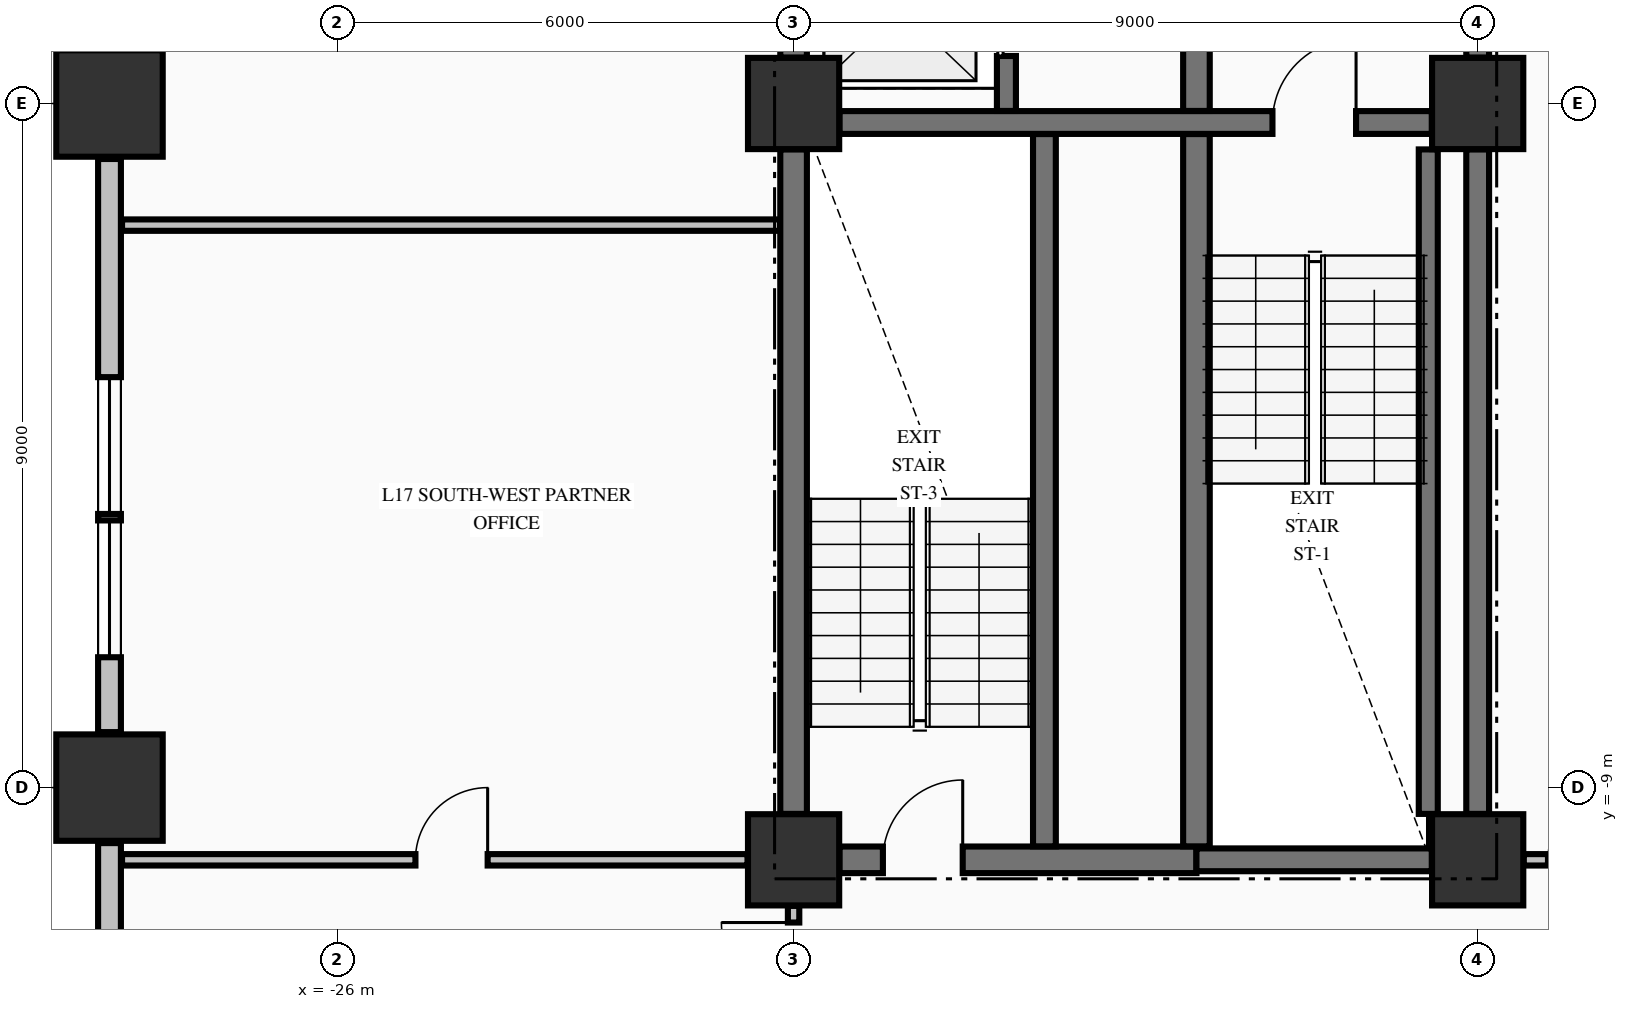
"""IFC4 building model, lengths in metres.
Left out: names, types, materials, properties, quantities, classifications, styles, units other than length and angle.
Written with IfcOpenShell. Run it as: python <this file> out.ifc"""

import sys

from ifc_helpers import new_model, si_unit, direction, frame, frame_2d, origin, origin_2d, place, context, subcontext, project, spatial, rectangle, extrude, element, fill, save


model = new_model("IFC4")
c1 = context("Model", 3, precision=1e-05, world=origin(), true_north=direction((0.0, 1.0)))
c2 = subcontext(c1, "Body", "Model", "MODEL_VIEW")
j1 = project(units=[si_unit("LENGTHUNIT", "METRE"), si_unit("PLANEANGLEUNIT", "RADIAN")], contexts=[c1])
p1 = place(None, origin())
s1 = spatial("IfcSite", under=j1, at=p1, CompositionType="ELEMENT")
p2 = place(p1, origin())
s2 = spatial("IfcBuilding", under=s1, at=p2, CompositionType="ELEMENT")
p3 = place(p2, frame((0.0, 0.0, 71.47)))
s3 = spatial("IfcBuildingStorey", under=s2, at=p3, CompositionType="ELEMENT", Elevation=71.47)
for number, where, z_axis, x_axis in (
    (1, (-29.0, -9.0, -0.325), (0.0, 0.0, 1.0), (1.0, 0.0, 0.0)),
    (2, (-29.0, 0.0, -0.325), (0.0, 0.0, 1.0), (1.0, 0.0, 0.0)),
):
    element("IfcColumn", number, at=place(p3, frame(where, z_axis=z_axis, x_axis=x_axis)), inside=s3, PredefinedType="COLUMN", context=c2, shape_type="SweptSolid", body=[
        extrude(rectangle(XDim=1.4, YDim=1.4, at=origin_2d()), origin(), (0.0, 0.0, 1.0), 3.645),
    ])
for number, where, z_axis, x_axis in (
    (3, (-20.0, -9.95, -0.325), (0.0, 0.0, 1.0), (1.0, 0.0, 0.0)),
    (4, (-11.0, -9.95, -0.325), (0.0, 0.0, 1.0), (1.0, 0.0, 0.0)),
    (5, (-11.0, 0.0, -0.325), (0.0, 0.0, 1.0), (1.0, 0.0, 0.0)),
    (6, (-20.0, 0.0, -0.325), (0.0, 0.0, 1.0), (1.0, 0.0, 0.0)),
):
    element("IfcColumn", number, at=place(p3, frame(where, z_axis=z_axis, x_axis=x_axis)), inside=s3, PredefinedType="COLUMN", context=c2, shape_type="SweptSolid", body=[
        extrude(rectangle(XDim=1.2, YDim=1.2, at=origin_2d()), origin(), (0.0, 0.0, 1.0), 3.645),
    ])
p4 = place(p3, frame((-29.0, -9.73, 0.0), z_axis=(0.0, 0.0, 1.0), x_axis=(0.0, -1.0, 0.0)))
e7 = element("IfcWall", 7, at=p4, inside=s3, PredefinedType="STANDARD", context=c2, shape_type="SweptSolid", body=[
    extrude(rectangle(XDim=12.54, YDim=0.3, at=frame_2d((6.27, 0.0))), origin(), (0.0, 0.0, 1.0), 2.712),
])
p5 = place(p3, frame((-29.0, -0.73, 0.0), z_axis=(0.0, 0.0, 1.0), x_axis=(0.0, -1.0, 0.0)))
e8 = element("IfcWall", 8, at=p5, inside=s3, PredefinedType="STANDARD", context=c2, shape_type="SweptSolid", body=[
    extrude(rectangle(XDim=7.54, YDim=0.3, at=frame_2d((3.77, 0.0))), origin(), (0.0, 0.0, 1.0), 2.712),
])
p6 = place(p5, frame((2.87, 0.0, 0.78)))
e9 = element("IfcOpeningElement", 9, at=p6, cuts=e8, PredefinedType="OPENING", context=c2, shape_type="SweptSolid", body=[
    extrude(rectangle(XDim=1.8, YDim=1.72, at=frame_2d((0.9, 0.86))), frame((0.0, 0.16, 0.0), z_axis=(0.0, -1.0, 0.0), x_axis=(1.0, 0.0, 0.0)), (0.0, 0.0, 1.0), 0.32),
])
p7 = place(p5, frame((4.755, 0.0, 0.78)))
e10 = element("IfcOpeningElement", 10, at=p7, cuts=e8, PredefinedType="OPENING", context=c2, shape_type="SweptSolid", body=[
    extrude(rectangle(XDim=1.8, YDim=1.72, at=frame_2d((0.9, 0.86))), frame((0.0, 0.16, 0.0), z_axis=(0.0, -1.0, 0.0), x_axis=(1.0, 0.0, 0.0)), (0.0, 0.0, 1.0), 0.32),
])
p8 = place(p3, frame((-19.396, -9.95, 0.0), z_axis=(0.0, 0.0, 1.0), x_axis=(1.0, 0.0, 0.0)))
e11 = element("IfcWall", 11, at=p8, inside=s3, PredefinedType="SHEAR", context=c2, shape_type="SweptSolid", body=[
    extrude(rectangle(XDim=4.696, YDim=0.35, at=frame_2d((2.348, 0.0))), origin(), (0.0, 0.0, 1.0), 3.32),
])
p9 = place(p8, frame((0.571, 0.0, 0.0)))
e12 = element("IfcOpeningElement", 12, at=p9, cuts=e11, PredefinedType="OPENING", context=c2, shape_type="SweptSolid", body=[
    extrude(rectangle(XDim=1.05, YDim=2.15, at=frame_2d((0.525, 1.075))), frame((0.0, 0.185, 0.0), z_axis=(0.0, -1.0, 0.0), x_axis=(1.0, 0.0, 0.0)), (0.0, 0.0, 1.0), 0.37),
])
p10 = place(p3, frame((-14.7, -9.95, 0.0), z_axis=(0.0, 0.0, 1.0), x_axis=(1.0, 0.0, 0.0)))
e13 = element("IfcWall", 13, at=p10, inside=s3, PredefinedType="SHEAR", context=c2, shape_type="SweptSolid", body=[
    extrude(rectangle(XDim=3.096, YDim=0.3, at=frame_2d((1.548, 0.0))), origin(), (0.0, 0.0, 1.0), 3.32),
])
p11 = place(p3, frame((-19.396, -0.25, 0.0), z_axis=(0.0, 0.0, 1.0), x_axis=(1.0, 0.0, 0.0)))
e14 = element("IfcWall", 14, at=p11, inside=s3, PredefinedType="SHEAR", context=c2, shape_type="SweptSolid", body=[
    extrude(rectangle(XDim=7.792, YDim=0.3, at=frame_2d((3.896, 0.0))), origin(), (0.0, 0.0, 1.0), 3.32),
])
p12 = place(p11, frame((5.696, 0.0, 0.0)))
e15 = element("IfcOpeningElement", 15, at=p12, cuts=e14, PredefinedType="OPENING", context=c2, shape_type="SweptSolid", body=[
    extrude(rectangle(XDim=1.1, YDim=2.15, at=frame_2d((0.55, 1.075))), frame((0.0, 0.16, 0.0), z_axis=(0.0, -1.0, 0.0), x_axis=(1.0, 0.0, 0.0)), (0.0, 0.0, 1.0), 0.32),
])
p13 = place(p3, frame((-28.835, -9.95, 0.0), z_axis=(0.0, 0.0, 1.0), x_axis=(1.0, 0.0, 0.0)))
e16 = element("IfcWall", 16, at=p13, inside=s3, PredefinedType="PARTITIONING", context=c2, shape_type="SweptSolid", body=[
    extrude(rectangle(XDim=8.229, YDim=0.15, at=frame_2d((4.115, 0.0))), origin(), (0.0, 0.0, 1.0), 3.32),
])
p14 = place(p13, frame((3.86, 0.0, 0.0)))
e17 = element("IfcOpeningElement", 17, at=p14, cuts=e16, PredefinedType="OPENING", context=c2, shape_type="SweptSolid", body=[
    extrude(rectangle(XDim=0.95, YDim=2.15, at=frame_2d((0.475, 1.075))), frame((0.0, 0.085, 0.0), z_axis=(0.0, -1.0, 0.0), x_axis=(1.0, 0.0, 0.0)), (0.0, 0.0, 1.0), 0.17),
])
p15 = place(p3, frame((-10.394, -9.95, 0.0), z_axis=(0.0, 0.0, 1.0), x_axis=(1.0, 0.0, 0.0)))
e18 = element("IfcWall", 18, at=p15, inside=s3, PredefinedType="PARTITIONING", context=c2, shape_type="SweptSolid", body=[
    extrude(rectangle(XDim=20.788, YDim=0.15, at=frame_2d((10.394, 0.0))), origin(), (0.0, 0.0, 1.0), 3.32),
])
p16 = place(p15, frame((0.319, 0.0, 0.0)))
e19 = element("IfcOpeningElement", 19, at=p16, cuts=e18, PredefinedType="OPENING", context=c2, shape_type="SweptSolid", body=[
    extrude(rectangle(XDim=1.05, YDim=2.15, at=frame_2d((0.525, 1.075))), frame((0.0, 0.085, 0.0), z_axis=(0.0, -1.0, 0.0), x_axis=(1.0, 0.0, 0.0)), (0.0, 0.0, 1.0), 0.17),
])
p17 = place(p15, frame((19.419, 0.0, 0.0)))
e20 = element("IfcOpeningElement", 20, at=p17, cuts=e18, PredefinedType="OPENING", context=c2, shape_type="SweptSolid", body=[
    extrude(rectangle(XDim=1.05, YDim=2.15, at=frame_2d((0.525, 1.075))), frame((0.0, 0.085, 0.0), z_axis=(0.0, -1.0, 0.0), x_axis=(1.0, 0.0, 0.0)), (0.0, 0.0, 1.0), 0.17),
])
p18 = place(p15, frame((11.569, 0.0, 0.0)))
e21 = element("IfcOpeningElement", 21, at=p18, cuts=e18, PredefinedType="OPENING", context=c2, shape_type="SweptSolid", body=[
    extrude(rectangle(XDim=0.95, YDim=2.15, at=frame_2d((0.475, 1.075))), frame((0.0, 0.085, 0.0), z_axis=(0.0, -1.0, 0.0), x_axis=(1.0, 0.0, 0.0)), (0.0, 0.0, 1.0), 0.17),
])
p19 = place(p3, frame((-28.835, -1.6, 0.0), z_axis=(0.0, 0.0, 1.0), x_axis=(1.0, 0.0, 0.0)))
e22 = element("IfcWall", 22, at=p19, inside=s3, PredefinedType="PARTITIONING", context=c2, shape_type="SweptSolid", body=[
    extrude(rectangle(XDim=8.657, YDim=0.15, at=frame_2d((4.329, 0.0))), origin(), (0.0, 0.0, 1.0), 3.32),
])
p20 = place(p3, frame((-20.0, -9.346, 0.0), z_axis=(0.0, 0.0, 1.0), x_axis=(0.0, 1.0, 0.0)))
e23 = element("IfcWall", 23, at=p20, inside=s3, PredefinedType="SHEAR", context=c2, shape_type="SweptSolid", body=[
    extrude(rectangle(XDim=8.742, YDim=0.35, at=frame_2d((4.371, 0.0))), origin(), (0.0, 0.0, 1.0), 3.32),
])
p21 = place(p3, frame((-20.0, 0.604, 0.0), z_axis=(0.0, 0.0, 1.0), x_axis=(0.0, 1.0, 0.0)))
e24 = element("IfcWall", 24, at=p21, inside=s3, PredefinedType="SHEAR", context=c2, shape_type="SweptSolid", body=[
    extrude(rectangle(XDim=1.869, YDim=0.35, at=frame_2d((0.935, 0.0))), origin(), (0.0, 0.0, 1.0), 3.32),
])
p22 = place(p3, frame((-17.2, -0.098, 0.0), z_axis=(0.0, 0.0, 1.0), x_axis=(0.0, 1.0, 0.0)))
e25 = element("IfcWall", 25, at=p22, inside=s3, PredefinedType="SOLIDWALL", context=c2, shape_type="SweptSolid", body=[
    extrude(rectangle(XDim=2.571, YDim=0.25, at=frame_2d((1.285, 0.0))), origin(), (0.0, 0.0, 1.0), 3.32),
])
p23 = place(p22, frame((0.723, 0.0, 0.0)))
e26 = element("IfcOpeningElement", 26, at=p23, cuts=e25, PredefinedType="OPENING", context=c2, shape_type="SweptSolid", body=[
    extrude(rectangle(XDim=1.1, YDim=2.2, at=frame_2d((0.55, 1.1))), frame((0.0, 0.135, 0.0), z_axis=(0.0, -1.0, 0.0), x_axis=(1.0, 0.0, 0.0)), (0.0, 0.0, 1.0), 0.27),
])
p24 = place(p3, frame((-16.7, -9.773, 0.0), z_axis=(0.0, 0.0, 1.0), x_axis=(0.0, 1.0, 0.0)))
e27 = element("IfcWall", 27, at=p24, inside=s3, PredefinedType="SHEAR", context=c2, shape_type="SweptSolid", body=[
    extrude(rectangle(XDim=9.371, YDim=0.3, at=frame_2d((4.686, 0.0))), origin(), (0.0, 0.0, 1.0), 3.32),
])
p25 = place(p3, frame((-14.7, -9.773, 0.0), z_axis=(0.0, 0.0, 1.0), x_axis=(0.0, 1.0, 0.0)))
e28 = element("IfcWall", 28, at=p25, inside=s3, PredefinedType="SHEAR", context=c2, shape_type="SweptSolid", body=[
    extrude(rectangle(XDim=9.371, YDim=0.35, at=frame_2d((4.686, 0.0))), origin(), (0.0, 0.0, 1.0), 3.32),
])
p26 = place(p3, frame((-14.7, -0.098, 0.0), z_axis=(0.0, 0.0, 1.0), x_axis=(0.0, 1.0, 0.0)))
e29 = element("IfcWall", 29, at=p26, inside=s3, PredefinedType="SHEAR", context=c2, shape_type="SweptSolid", body=[
    extrude(rectangle(XDim=2.846, YDim=0.35, at=frame_2d((1.423, 0.0))), origin(), (0.0, 0.0, 1.0), 3.32),
])
p27 = place(p3, frame((-11.65, -9.346, 0.0), z_axis=(0.0, 0.0, 1.0), x_axis=(0.0, 1.0, 0.0)))
e30 = element("IfcWall", 30, at=p27, inside=s3, PredefinedType="SOLIDWALL", context=c2, shape_type="SweptSolid", body=[
    extrude(rectangle(XDim=8.742, YDim=0.25, at=frame_2d((4.371, 0.0))), origin(), (0.0, 0.0, 1.0), 3.32),
])
p28 = place(p3, frame((-11.0, -9.346, 0.0), z_axis=(0.0, 0.0, 1.0), x_axis=(0.0, 1.0, 0.0)))
e31 = element("IfcWall", 31, at=p28, inside=s3, PredefinedType="SHEAR", context=c2, shape_type="SweptSolid", body=[
    extrude(rectangle(XDim=8.742, YDim=0.3, at=frame_2d((4.371, 0.0))), origin(), (0.0, 0.0, 1.0), 3.32),
])
p29 = place(p3, frame((-11.0, 0.604, 0.0), z_axis=(0.0, 0.0, 1.0), x_axis=(0.0, 1.0, 0.0)))
e32 = element("IfcWall", 32, at=p29, inside=s3, PredefinedType="SHEAR", context=c2, shape_type="SweptSolid", body=[
    extrude(rectangle(XDim=2.144, YDim=0.3, at=frame_2d((1.072, 0.0))), origin(), (0.0, 0.0, 1.0), 3.32),
])
p30 = place(p29, frame((0.496, 0.0, 0.0)))
e33 = element("IfcOpeningElement", 33, at=p30, cuts=e32, PredefinedType="OPENING", context=c2, shape_type="SweptSolid", body=[
    extrude(rectangle(XDim=1.1, YDim=2.15, at=frame_2d((0.55, 1.075))), frame((0.0, 0.16, 0.0), z_axis=(0.0, -1.0, 0.0), x_axis=(1.0, 0.0, 0.0)), (0.0, 0.0, 1.0), 0.32),
])
p31 = place(p3, frame((-20.0, -12.472, 0.0), z_axis=(0.0, 0.0, 1.0), x_axis=(0.0, 1.0, 0.0)))
e34 = element("IfcWall", 34, at=p31, inside=s3, PredefinedType="PARTITIONING", context=c2, shape_type="SweptSolid", body=[
    extrude(rectangle(XDim=1.916, YDim=0.15, at=frame_2d((0.958, 0.0))), origin(), (0.0, 0.0, 1.0), 2.66),
])
p32 = place(p31, frame((0.747, 0.0, 0.0)))
e35 = element("IfcOpeningElement", 35, at=p32, cuts=e34, PredefinedType="OPENING", context=c2, shape_type="SweptSolid", body=[
    extrude(rectangle(XDim=0.95, YDim=2.15, at=frame_2d((0.475, 1.075))), frame((0.0, 0.085, 0.0), z_axis=(0.0, -1.0, 0.0), x_axis=(1.0, 0.0, 0.0)), (0.0, 0.0, 1.0), 0.17),
])
p33 = place(p6, origin())
e36 = element("IfcWindow", 36, at=p33, inside=s3, PartitioningType="SINGLE_PANEL", PredefinedType="WINDOW", context=c2, shape_type="SweptSolid", body=[
    extrude(rectangle(XDim=1.8, YDim=1.72, at=frame_2d((0.9, 0.86))), frame((0.0, 0.03, 0.0), z_axis=(0.0, -1.0, 0.0), x_axis=(1.0, 0.0, 0.0)), (0.0, 0.0, 1.0), 0.06),
])
fill(e9, e36)
p34 = place(p7, origin())
e37 = element("IfcWindow", 37, at=p34, inside=s3, PartitioningType="SINGLE_PANEL", PredefinedType="WINDOW", context=c2, shape_type="SweptSolid", body=[
    extrude(rectangle(XDim=1.8, YDim=1.72, at=frame_2d((0.9, 0.86))), frame((0.0, 0.03, 0.0), z_axis=(0.0, -1.0, 0.0), x_axis=(1.0, 0.0, 0.0)), (0.0, 0.0, 1.0), 0.06),
])
fill(e10, e37)
p35 = place(p12, origin())
e38 = element("IfcDoor", 38, at=p35, inside=s3, OperationType="SINGLE_SWING_RIGHT", PredefinedType="DOOR", context=c2, shape_type="SweptSolid", body=[
    extrude(rectangle(XDim=1.1, YDim=2.15, at=frame_2d((0.55, 1.075))), frame((0.0, 0.025, 0.0), z_axis=(0.0, -1.0, 0.0), x_axis=(1.0, 0.0, 0.0)), (0.0, 0.0, 1.0), 0.05),
])
fill(e15, e38)
p36 = place(p9, origin())
e39 = element("IfcDoor", 39, at=p36, inside=s3, OperationType="SINGLE_SWING_RIGHT", PredefinedType="DOOR", context=c2, shape_type="SweptSolid", body=[
    extrude(rectangle(XDim=1.05, YDim=2.15, at=frame_2d((0.525, 1.075))), frame((0.0, 0.025, 0.0), z_axis=(0.0, -1.0, 0.0), x_axis=(1.0, 0.0, 0.0)), (0.0, 0.0, 1.0), 0.05),
])
fill(e12, e39)
p37 = place(p23, origin())
e40 = element("IfcDoor", 40, at=p37, inside=s3, OperationType="SLIDING_TO_LEFT", PredefinedType="DOOR", context=c2, shape_type="SweptSolid", body=[
    extrude(rectangle(XDim=1.1, YDim=2.2, at=frame_2d((0.55, 1.1))), frame((0.0, 0.025, 0.0), z_axis=(0.0, -1.0, 0.0), x_axis=(1.0, 0.0, 0.0)), (0.0, 0.0, 1.0), 0.05),
])
fill(e26, e40)
p38 = place(p32, origin())
e41 = element("IfcDoor", 41, at=p38, inside=s3, OperationType="SINGLE_SWING_RIGHT", PredefinedType="DOOR", context=c2, shape_type="SweptSolid", body=[
    extrude(rectangle(XDim=0.95, YDim=2.15, at=frame_2d((0.475, 1.075))), frame((0.0, 0.025, 0.0), z_axis=(0.0, -1.0, 0.0), x_axis=(1.0, 0.0, 0.0)), (0.0, 0.0, 1.0), 0.05),
])
fill(e35, e41)
p39 = place(p14, origin())
e42 = element("IfcDoor", 42, at=p39, inside=s3, OperationType="SINGLE_SWING_RIGHT", PredefinedType="DOOR", context=c2, shape_type="SweptSolid", body=[
    extrude(rectangle(XDim=0.95, YDim=2.15, at=frame_2d((0.475, 1.075))), frame((0.0, 0.025, 0.0), z_axis=(0.0, -1.0, 0.0), x_axis=(1.0, 0.0, 0.0)), (0.0, 0.0, 1.0), 0.05),
])
fill(e17, e42)
save(model, sys.argv[1])
